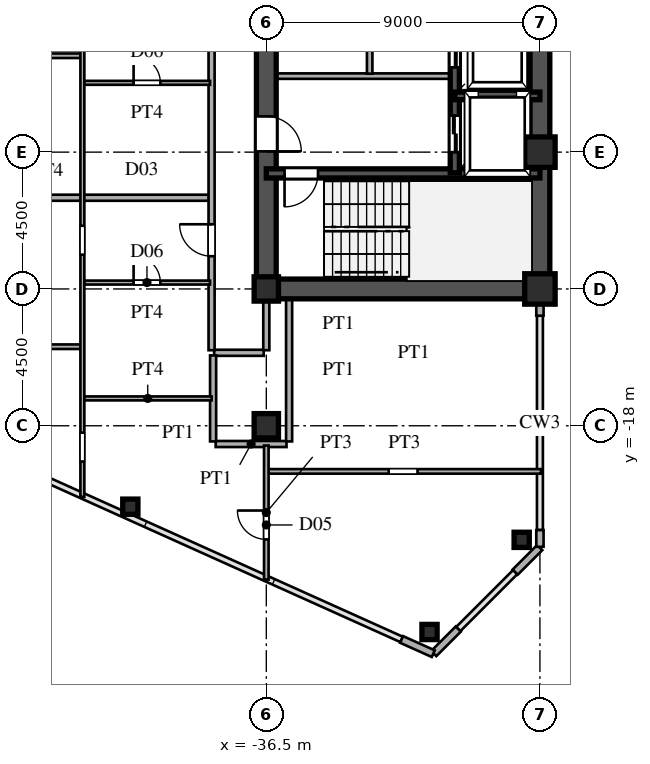
"""IFC4 building model, lengths in metres.
Left out: names, types, materials, properties, quantities, classifications, styles, units other than length and angle.
Written with IfcOpenShell. Run it as: python <this file> out.ifc"""

import sys

from ifc_helpers import new_model, si_unit, direction, frame, frame_2d, origin, origin_2d, place, context, subcontext, project, spatial, rectangle, hollow_rectangle, i_section, extrude, source, transform, mapped, element, fill, save


model = new_model("IFC4")
c1 = context("Model", 3, precision=1e-05, world=origin(), true_north=direction((0.0, 1.0)))
c2 = subcontext(c1, "Body", "Model", "MODEL_VIEW")
j1 = project(units=[si_unit("LENGTHUNIT", "METRE"), si_unit("PLANEANGLEUNIT", "RADIAN")], contexts=[c1])
p1 = place(None, origin())
s1 = spatial("IfcSite", under=j1, at=p1, CompositionType="ELEMENT")
p2 = place(p1, origin())
s2 = spatial("IfcBuilding", under=s1, at=p2, CompositionType="ELEMENT")
p3 = place(p2, frame((0.0, 0.0, 106.8)))
s3 = spatial("IfcBuildingStorey", under=s2, at=p3, CompositionType="ELEMENT", Elevation=106.8)
m1 = source(origin(), c2, "Body", "SweptSolid", [
    extrude(hollow_rectangle(XDim=1.0, YDim=1.0, WallThickness=0.042, at=origin_2d()), origin(), (0.0, 0.0, 1.0), 3.6),
])
for number, where, z_axis, x_axis in (
    (1, (-27.5, -13.5, 0.0), (0.0, 0.0, 1.0), (1.0, 0.0, 0.0)),
    (2, (-27.5, -9.0, 0.0), (0.0, 0.0, 1.0), (1.0, 0.0, 0.0)),
):
    element("IfcColumn", number, at=place(p3, frame(where, z_axis=z_axis, x_axis=x_axis)), inside=s3, PredefinedType="COLUMN", context=c2, shape_type="MappedRepresentation", body=[
        mapped(m1, transform((0.0, 0.0, 0.0), scale=1.0)),
    ])
m2 = source(origin(), c2, "Body", "SweptSolid", [
    extrude(i_section(OverallWidth=0.8, OverallDepth=0.8, WebThickness=0.032, FlangeThickness=0.05, at=origin_2d()), origin(), (0.0, 0.0, 1.0), 3.6),
])
for number, where, z_axis, x_axis in (
    (3, (-36.5, -18.0, 0.0), (0.0, 0.0, 1.0), (1.0, 0.0, 0.0)),
    (4, (-36.5, -13.5, 0.0), (0.0, 0.0, 1.0), (1.0, 0.0, 0.0)),
):
    element("IfcColumn", number, at=place(p3, frame(where, z_axis=z_axis, x_axis=x_axis)), inside=s3, PredefinedType="COLUMN", context=c2, shape_type="MappedRepresentation", body=[
        mapped(m2, transform((0.0, 0.0, 0.0), scale=1.0)),
    ])
m3 = source(origin(), c2, "Body", "SweptSolid", [
    extrude(hollow_rectangle(XDim=0.5, YDim=0.5, WallThickness=0.02, at=origin_2d()), origin(), (0.0, 0.0, 1.0), 3.6),
])
for number, where, z_axis, x_axis in (
    (5, (-28.1, -21.751, 0.0), (0.0, 0.0, 1.0), (1.0, 0.0, 0.0)),
    (6, (-31.131, -24.783, 0.0), (0.0, 0.0, 1.0), (1.0, 0.0, 0.0)),
    (7, (-40.973, -20.661, 0.0), (0.0, 0.0, 1.0), (1.0, 0.0, 0.0)),
):
    element("IfcColumn", number, at=place(p3, frame(where, z_axis=z_axis, x_axis=x_axis)), inside=s3, PredefinedType="COLUMN", context=c2, shape_type="MappedRepresentation", body=[
        mapped(m3, transform((0.0, 0.0, 0.0), scale=1.0)),
    ])
p4 = place(p3, frame((-27.5, -21.98, 0.0), z_axis=(0.0, 0.0, 1.0), x_axis=(0.0, 1.0, 0.0)))
e8 = element("IfcWall", 8, at=p4, inside=s3, PredefinedType="SOLIDWALL", context=c2, shape_type="SweptSolid", body=[
    extrude(rectangle(XDim=0.55, YDim=0.24, at=frame_2d((0.275, 0.0))), origin(), (0.0, 0.0, 1.0), 3.38),
])
p5 = place(p3, frame((-27.5, -14.38, 0.0), z_axis=(0.0, 0.0, 1.0), x_axis=(0.0, 1.0, 0.0)))
e9 = element("IfcWall", 9, at=p5, inside=s3, PredefinedType="SOLIDWALL", context=c2, shape_type="SweptSolid", body=[
    extrude(rectangle(XDim=0.55, YDim=0.24, at=frame_2d((0.275, 0.0))), origin(), (0.0, 0.0, 1.0), 1.88),
])
p6 = place(p3, frame((-32.049, -25.028, 0.0), z_axis=(0.0, 0.0, 1.0), x_axis=(0.911929519623, -0.410346866979, 0.0)))
e10 = element("IfcWall", 10, at=p6, inside=s3, PredefinedType="SOLIDWALL", context=c2, shape_type="SweptSolid", body=[
    extrude(rectangle(XDim=1.14, YDim=0.24, at=frame_2d((0.57, 0.0))), origin(), (0.0, 0.0, 1.0), 3.38),
])
for number, where, z_axis, x_axis in (
    (11, (-30.993, -25.493, 0.0), (0.0, 0.0, 1.0), (0.707, 0.707, 0.0)),
    (12, (-28.313, -22.813, 0.0), (0.0, 0.0, 1.0), (0.707, 0.707, 0.0)),
):
    element("IfcWall", number, at=place(p3, frame(where, z_axis=z_axis, x_axis=x_axis)), inside=s3, PredefinedType="SOLIDWALL", context=c2, shape_type="SweptSolid", body=[
        extrude(rectangle(XDim=1.14, YDim=0.24, at=frame_2d((0.57, 0.0))), origin(), (0.0, 0.0, 1.0), 3.38),
    ])
p7 = place(p3, frame((-27.5, -13.5, 0.0), z_axis=(0.0, 0.0, 1.0), x_axis=(0.0, 1.0, 0.0)))
e13 = element("IfcWall", 13, at=p7, inside=s3, PredefinedType="SHEAR", context=c2, shape_type="SweptSolid", body=[
    extrude(rectangle(XDim=12.2, YDim=0.65, at=frame_2d((6.1, 0.0))), origin(), (0.0, 0.0, 1.0), 3.38),
])
p8 = place(p3, frame((-36.5, -13.5, 0.0), z_axis=(0.0, 0.0, 1.0), x_axis=(1.0, 0.0, 0.0)))
e14 = element("IfcWall", 14, at=p8, inside=s3, PredefinedType="SHEAR", context=c2, shape_type="SweptSolid", body=[
    extrude(rectangle(XDim=9.0, YDim=0.65, at=frame_2d((4.5, 0.0))), origin(), (0.0, 0.0, 1.0), 3.38),
])
p9 = place(p3, frame((-36.5, -13.65, 0.0), z_axis=(0.0, 0.0, 1.0), x_axis=(0.0, 1.0, 0.0)))
e15 = element("IfcWall", 15, at=p9, inside=s3, PredefinedType="SHEAR", context=c2, shape_type="SweptSolid", body=[
    extrude(rectangle(XDim=7.15, YDim=0.65, at=frame_2d((3.575, 0.0))), origin(), (0.0, 0.0, 1.0), 3.38),
])
p10 = place(p9, frame((4.675, 0.0, 0.0)))
e16 = element("IfcOpeningElement", 16, at=p10, cuts=e15, PredefinedType="OPENING", context=c2, shape_type="SweptSolid", body=[
    extrude(rectangle(XDim=1.15, YDim=2.2, at=frame_2d((0.575, 1.1))), frame((0.0, 0.335, 0.0), z_axis=(0.0, -1.0, 0.0), x_axis=(1.0, 0.0, 0.0)), (0.0, 0.0, 1.0), 0.67),
])
p11 = place(p3, frame((-36.5, -6.5, 0.0), z_axis=(0.0, 0.0, 1.0), x_axis=(0.0, 1.0, 0.0)))
e17 = element("IfcWall", 17, at=p11, inside=s3, PredefinedType="SHEAR", context=c2, shape_type="SweptSolid", body=[
    extrude(rectangle(XDim=5.2, YDim=0.65, at=frame_2d((2.6, 0.0))), origin(), (0.0, 0.0, 1.0), 3.38),
])
p12 = place(p11, frame((2.125, 0.0, 0.0)))
e18 = element("IfcOpeningElement", 18, at=p12, cuts=e17, PredefinedType="OPENING", context=c2, shape_type="SweptSolid", body=[
    extrude(rectangle(XDim=0.95, YDim=2.15, at=frame_2d((0.475, 1.075))), frame((0.0, 0.335, 0.0), z_axis=(0.0, -1.0, 0.0), x_axis=(1.0, 0.0, 0.0)), (0.0, 0.0, 1.0), 0.67),
])
p13 = place(p3, frame((-36.5, -9.7, 0.0), z_axis=(0.0, 0.0, 1.0), x_axis=(1.0, 0.0, 0.0)))
e19 = element("IfcWall", 19, at=p13, inside=s3, PredefinedType="SHEAR", context=c2, shape_type="SweptSolid", body=[
    extrude(rectangle(XDim=9.0, YDim=0.3, at=frame_2d((4.5, 0.0))), origin(), (0.0, 0.0, 1.0), 3.38),
])
p14 = place(p13, frame((0.6, 0.0, 0.0)))
e20 = element("IfcOpeningElement", 20, at=p14, cuts=e19, PredefinedType="OPENING", context=c2, shape_type="SweptSolid", body=[
    extrude(rectangle(XDim=1.1, YDim=2.2, at=frame_2d((0.55, 1.1))), frame((0.0, 0.16, 0.0), z_axis=(0.0, -1.0, 0.0), x_axis=(1.0, 0.0, 0.0)), (0.0, 0.0, 1.0), 0.32),
])
p15 = place(p3, frame((-30.3, -7.15, 0.0), z_axis=(0.0, 0.0, 1.0), x_axis=(1.0, 0.0, 0.0)))
e21 = element("IfcWall", 21, at=p15, inside=s3, PredefinedType="SHEAR", context=c2, shape_type="SweptSolid", body=[
    extrude(rectangle(XDim=2.8, YDim=0.25, at=frame_2d((1.4, 0.0))), origin(), (0.0, 0.0, 1.0), 3.38),
])
p16 = place(p3, frame((-30.3, -9.68, 0.0), z_axis=(0.0, 0.0, 1.0), x_axis=(0.0, 1.0, 0.0)))
e22 = element("IfcWall", 22, at=p16, inside=s3, PredefinedType="SHEAR", context=c2, shape_type="SweptSolid", body=[
    extrude(rectangle(XDim=2.56, YDim=0.3, at=frame_2d((1.28, 0.0))), origin(), (0.0, 0.0, 1.0), 3.38),
])
p17 = place(p16, frame((0.68, 0.0, 0.0)))
e23 = element("IfcOpeningElement", 23, at=p17, cuts=e22, PredefinedType="OPENING", context=c2, shape_type="SweptSolid", body=[
    extrude(rectangle(XDim=1.2, YDim=2.25, at=frame_2d((0.6, 1.125))), frame((0.0, 0.16, 0.0), z_axis=(0.0, -1.0, 0.0), x_axis=(1.0, 0.0, 0.0)), (0.0, 0.0, 1.0), 0.32),
])
p18 = place(p3, frame((-30.3, -7.12, 0.0), z_axis=(0.0, 0.0, 1.0), x_axis=(0.0, 1.0, 0.0)))
e24 = element("IfcWall", 24, at=p18, inside=s3, PredefinedType="SHEAR", context=c2, shape_type="SweptSolid", body=[
    extrude(rectangle(XDim=2.92, YDim=0.3, at=frame_2d((1.46, 0.0))), origin(), (0.0, 0.0, 1.0), 3.38),
])
p19 = place(p18, frame((0.91, 0.0, 0.0)))
e25 = element("IfcOpeningElement", 25, at=p19, cuts=e24, PredefinedType="OPENING", context=c2, shape_type="SweptSolid", body=[
    extrude(rectangle(XDim=1.1, YDim=2.2, at=frame_2d((0.55, 1.1))), frame((0.0, 0.16, 0.0), z_axis=(0.0, -1.0, 0.0), x_axis=(1.0, 0.0, 0.0)), (0.0, 0.0, 1.0), 0.32),
])
p20 = place(p3, frame((-36.15, -6.5, 0.0), z_axis=(0.0, 0.0, 1.0), x_axis=(1.0, 0.0, 0.0)))
e26 = element("IfcWall", 26, at=p20, inside=s3, PredefinedType="PARTITIONING", context=c2, shape_type="SweptSolid", body=[
    extrude(rectangle(XDim=5.7, YDim=0.18, at=frame_2d((2.85, 0.0))), origin(), (0.0, 0.0, 1.0), 3.38),
])
p21 = place(p3, frame((-33.1, -6.42, 0.0), z_axis=(0.0, 0.0, 1.0), x_axis=(0.0, 1.0, 0.0)))
e27 = element("IfcWall", 27, at=p21, inside=s3, PredefinedType="PARTITIONING", context=c2, shape_type="SweptSolid", body=[
    extrude(rectangle(XDim=5.04, YDim=0.18, at=frame_2d((2.52, 0.0))), origin(), (0.0, 0.0, 1.0), 3.38),
])
p22 = place(p3, frame((-36.45, -19.5, 0.0), z_axis=(0.0, 0.0, 1.0), x_axis=(1.0, 0.0, 0.0)))
e28 = element("IfcWall", 28, at=p22, inside=s3, PredefinedType="PARTITIONING", context=c2, shape_type="SweptSolid", body=[
    extrude(rectangle(XDim=8.985, YDim=0.15, at=frame_2d((4.492, 0.0))), origin(), (0.0, 0.0, 1.0), 3.38),
])
p23 = place(p22, frame((3.975, 0.0, 0.0)))
e29 = element("IfcOpeningElement", 29, at=p23, cuts=e28, PredefinedType="OPENING", context=c2, shape_type="SweptSolid", body=[
    extrude(rectangle(XDim=0.95, YDim=2.15, at=frame_2d((0.475, 1.075))), frame((0.0, 0.085, 0.0), z_axis=(0.0, -1.0, 0.0), x_axis=(1.0, 0.0, 0.0)), (0.0, 0.0, 1.0), 0.17),
])
p24 = place(p3, frame((-38.165, -18.6, 0.0), z_axis=(0.0, 0.0, 1.0), x_axis=(1.0, 0.0, 0.0)))
e30 = element("IfcWall", 30, at=p24, inside=s3, PredefinedType="PARTITIONING", context=c2, shape_type="SweptSolid", body=[
    extrude(rectangle(XDim=0.753, YDim=0.2, at=frame_2d((0.376, 0.0))), origin(), (0.0, 0.0, 1.0), 2.08),
])
p25 = place(p3, frame((-37.412, -18.6, 0.0), z_axis=(0.0, 0.0, 1.0), x_axis=(1.0, 0.0, 0.0)))
e31 = element("IfcWall", 31, at=p25, inside=s3, PredefinedType="PARTITIONING", context=c2, shape_type="SweptSolid", body=[
    extrude(rectangle(XDim=1.577, YDim=0.2, at=frame_2d((0.789, 0.0))), origin(), (0.0, 0.0, 1.0), 3.38),
])
p26 = place(p3, frame((-42.5, -17.1, 0.0), z_axis=(0.0, 0.0, 1.0), x_axis=(1.0, 0.0, 0.0)))
e32 = element("IfcWall", 32, at=p26, inside=s3, PredefinedType="PARTITIONING", context=c2, shape_type="SweptSolid", body=[
    extrude(rectangle(XDim=4.2, YDim=0.13, at=frame_2d((2.1, 0.0))), origin(), (0.0, 0.0, 1.0), 3.38),
])
p27 = place(p3, frame((-38.215, -15.6, 0.0), z_axis=(0.0, 0.0, 1.0), x_axis=(1.0, 0.0, 0.0)))
e33 = element("IfcWall", 33, at=p27, inside=s3, PredefinedType="PARTITIONING", context=c2, shape_type="SweptSolid", body=[
    extrude(rectangle(XDim=1.63, YDim=0.2, at=frame_2d((0.815, 0.0))), origin(), (0.0, 0.0, 1.0), 3.38),
])
p28 = place(p3, frame((-53.477, -15.4, 0.0), z_axis=(0.0, 0.0, 1.0), x_axis=(1.0, 0.0, 0.0)))
e34 = element("IfcWall", 34, at=p28, inside=s3, PredefinedType="PARTITIONING", context=c2, shape_type="SweptSolid", body=[
    extrude(rectangle(XDim=10.877, YDim=0.15, at=frame_2d((5.438, 0.0))), origin(), (0.0, 0.0, 1.0), 3.38),
])
p29 = place(p28, frame((7.465, 0.0, 0.0)))
e35 = element("IfcOpeningElement", 35, at=p29, cuts=e34, PredefinedType="OPENING", context=c2, shape_type="SweptSolid", body=[
    extrude(rectangle(XDim=0.95, YDim=2.15, at=frame_2d((0.475, 1.075))), frame((0.0, 0.085, 0.0), z_axis=(0.0, -1.0, 0.0), x_axis=(1.0, 0.0, 0.0)), (0.0, 0.0, 1.0), 0.17),
])
p30 = place(p3, frame((-42.5, -13.29, 0.0), z_axis=(0.0, 0.0, 1.0), x_axis=(1.0, 0.0, 0.0)))
e36 = element("IfcWall", 36, at=p30, inside=s3, PredefinedType="PARTITIONING", context=c2, shape_type="SweptSolid", body=[
    extrude(rectangle(XDim=4.15, YDim=0.13, at=frame_2d((2.075, 0.0))), origin(), (0.0, 0.0, 1.0), 3.38),
])
p31 = place(p30, frame((1.635, 0.0, 0.0)))
e37 = element("IfcOpeningElement", 37, at=p31, cuts=e36, PredefinedType="OPENING", context=c2, shape_type="SweptSolid", body=[
    extrude(rectangle(XDim=0.88, YDim=2.1, at=frame_2d((0.44, 1.05))), frame((0.0, 0.075, 0.0), z_axis=(0.0, -1.0, 0.0), x_axis=(1.0, 0.0, 0.0)), (0.0, 0.0, 1.0), 0.15),
])
p32 = place(p3, frame((-64.346, -10.5, 0.0), z_axis=(0.0, 0.0, 1.0), x_axis=(1.0, 0.0, 0.0)))
e38 = element("IfcWall", 38, at=p32, inside=s3, PredefinedType="PARTITIONING", context=c2, shape_type="SweptSolid", body=[
    extrude(rectangle(XDim=25.966, YDim=0.2, at=frame_2d((12.983, 0.0))), origin(), (0.0, 0.0, 1.0), 3.38),
])
p33 = place(p3, frame((-42.5, -6.72, 0.0), z_axis=(0.0, 0.0, 1.0), x_axis=(1.0, 0.0, 0.0)))
e39 = element("IfcWall", 39, at=p33, inside=s3, PredefinedType="PARTITIONING", context=c2, shape_type="SweptSolid", body=[
    extrude(rectangle(XDim=4.15, YDim=0.13, at=frame_2d((2.075, 0.0))), origin(), (0.0, 0.0, 1.0), 3.38),
])
p34 = place(p33, frame((1.635, 0.0, 0.0)))
e40 = element("IfcOpeningElement", 40, at=p34, cuts=e39, PredefinedType="OPENING", context=c2, shape_type="SweptSolid", body=[
    extrude(rectangle(XDim=0.88, YDim=2.1, at=frame_2d((0.44, 1.05))), frame((0.0, 0.075, 0.0), z_axis=(0.0, -1.0, 0.0), x_axis=(1.0, 0.0, 0.0)), (0.0, 0.0, 1.0), 0.15),
])
p35 = place(p3, frame((-71.035, -5.83, 0.0), z_axis=(0.0, 0.0, 1.0), x_axis=(1.0, 0.0, 0.0)))
e41 = element("IfcWall", 41, at=p35, inside=s3, PredefinedType="PARTITIONING", context=c2, shape_type="SweptSolid", body=[
    extrude(rectangle(XDim=28.435, YDim=0.15, at=frame_2d((14.217, 0.0))), origin(), (0.0, 0.0, 1.0), 3.38),
])
p36 = place(p35, frame((22.035, 0.0, 0.0)))
e42 = element("IfcOpeningElement", 42, at=p36, cuts=e41, PredefinedType="OPENING", context=c2, shape_type="SweptSolid", body=[
    extrude(rectangle(XDim=0.95, YDim=2.15, at=frame_2d((0.475, 1.075))), frame((0.0, 0.085, 0.0), z_axis=(0.0, -1.0, 0.0), x_axis=(1.0, 0.0, 0.0)), (0.0, 0.0, 1.0), 0.17),
])
p37 = place(p35, frame((13.21, 0.0, 0.0)))
e43 = element("IfcOpeningElement", 43, at=p37, cuts=e41, PredefinedType="OPENING", context=c2, shape_type="SweptSolid", body=[
    extrude(rectangle(XDim=0.95, YDim=2.15, at=frame_2d((0.475, 1.075))), frame((0.0, 0.085, 0.0), z_axis=(0.0, -1.0, 0.0), x_axis=(1.0, 0.0, 0.0)), (0.0, 0.0, 1.0), 0.17),
])
p38 = place(p3, frame((-42.55, -20.337, 0.0), z_axis=(0.0, 0.0, 1.0), x_axis=(0.0, 1.0, 0.0)))
e44 = element("IfcWall", 44, at=p38, inside=s3, PredefinedType="PARTITIONING", context=c2, shape_type="SweptSolid", body=[
    extrude(rectangle(XDim=19.12, YDim=0.13, at=frame_2d((9.56, 0.0))), origin(), (0.0, 0.0, 1.0), 3.38),
])
p39 = place(p38, frame((7.965, 0.0, 0.0)))
e45 = element("IfcOpeningElement", 45, at=p39, cuts=e44, PredefinedType="OPENING", context=c2, shape_type="SweptSolid", body=[
    extrude(rectangle(XDim=0.95, YDim=2.15, at=frame_2d((0.475, 1.075))), frame((0.0, 0.075, 0.0), z_axis=(0.0, -1.0, 0.0), x_axis=(1.0, 0.0, 0.0)), (0.0, 0.0, 1.0), 0.15),
])
p40 = place(p38, frame((1.161, 0.0, 0.0)))
e46 = element("IfcOpeningElement", 46, at=p40, cuts=e44, PredefinedType="OPENING", context=c2, shape_type="SweptSolid", body=[
    extrude(rectangle(XDim=0.95, YDim=2.15, at=frame_2d((0.475, 1.075))), frame((0.0, 0.075, 0.0), z_axis=(0.0, -1.0, 0.0), x_axis=(1.0, 0.0, 0.0)), (0.0, 0.0, 1.0), 0.15),
])
p41 = place(p38, frame((16.362, 0.0, 0.0)))
e47 = element("IfcOpeningElement", 47, at=p41, cuts=e44, PredefinedType="OPENING", context=c2, shape_type="SweptSolid", body=[
    extrude(rectangle(XDim=0.95, YDim=2.15, at=frame_2d((0.475, 1.075))), frame((0.0, 0.075, 0.0), z_axis=(0.0, -1.0, 0.0), x_axis=(1.0, 0.0, 0.0)), (0.0, 0.0, 1.0), 0.15),
])
p42 = place(p3, frame((-38.3, -15.515, 0.0), z_axis=(0.0, 0.0, 1.0), x_axis=(0.0, 1.0, 0.0)))
e48 = element("IfcWall", 48, at=p42, inside=s3, PredefinedType="PARTITIONING", context=c2, shape_type="SweptSolid", body=[
    extrude(rectangle(XDim=31.03, YDim=0.2, at=frame_2d((15.515, 0.0))), origin(), (0.0, 0.0, 1.0), 3.38),
])
p43 = place(p42, frame((3.093, 0.0, 0.0)))
e49 = element("IfcOpeningElement", 49, at=p43, cuts=e48, PredefinedType="OPENING", context=c2, shape_type="SweptSolid", body=[
    extrude(rectangle(XDim=1.05, YDim=2.25, at=frame_2d((0.525, 1.125))), frame((0.0, 0.11, 0.0), z_axis=(0.0, -1.0, 0.0), x_axis=(1.0, 0.0, 0.0)), (0.0, 0.0, 1.0), 0.22),
])
p44 = place(p42, frame((11.28, 0.0, 0.0)))
e50 = element("IfcOpeningElement", 50, at=p44, cuts=e48, PredefinedType="OPENING", context=c2, shape_type="SweptSolid", body=[
    extrude(rectangle(XDim=1.05, YDim=2.25, at=frame_2d((0.525, 1.125))), frame((0.0, 0.11, 0.0), z_axis=(0.0, -1.0, 0.0), x_axis=(1.0, 0.0, 0.0)), (0.0, 0.0, 1.0), 0.22),
])
p45 = place(p42, frame((19.887, 0.0, 0.0)))
e51 = element("IfcOpeningElement", 51, at=p45, cuts=e48, PredefinedType="OPENING", context=c2, shape_type="SweptSolid", body=[
    extrude(rectangle(XDim=1.05, YDim=2.25, at=frame_2d((0.525, 1.125))), frame((0.0, 0.11, 0.0), z_axis=(0.0, -1.0, 0.0), x_axis=(1.0, 0.0, 0.0)), (0.0, 0.0, 1.0), 0.22),
])
p46 = place(p3, frame((-38.25, -18.515, 0.0), z_axis=(0.0, 0.0, 1.0), x_axis=(0.0, 1.0, 0.0)))
e52 = element("IfcWall", 52, at=p46, inside=s3, PredefinedType="PARTITIONING", context=c2, shape_type="SweptSolid", body=[
    extrude(rectangle(XDim=2.83, YDim=0.2, at=frame_2d((1.415, 0.0))), origin(), (0.0, 0.0, 1.0), 3.38),
])
p47 = place(p3, frame((-36.5, -23.06, 0.0), z_axis=(0.0, 0.0, 1.0), x_axis=(0.0, 1.0, 0.0)))
e53 = element("IfcWall", 53, at=p47, inside=s3, PredefinedType="PARTITIONING", context=c2, shape_type="SweptSolid", body=[
    extrude(rectangle(XDim=4.41, YDim=0.15, at=frame_2d((2.205, 0.0))), origin(), (0.0, 0.0, 1.0), 3.38),
])
p48 = place(p47, frame((1.323, 0.0, 0.0)))
e54 = element("IfcOpeningElement", 54, at=p48, cuts=e53, PredefinedType="OPENING", context=c2, shape_type="SweptSolid", body=[
    extrude(rectangle(XDim=0.95, YDim=2.15, at=frame_2d((0.475, 1.075))), frame((0.0, 0.085, 0.0), z_axis=(0.0, -1.0, 0.0), x_axis=(1.0, 0.0, 0.0)), (0.0, 0.0, 1.0), 0.17),
])
p49 = place(p3, frame((-36.5, -15.515, 0.0), z_axis=(0.0, 0.0, 1.0), x_axis=(0.0, 1.0, 0.0)))
e55 = element("IfcWall", 55, at=p49, inside=s3, PredefinedType="PARTITIONING", context=c2, shape_type="SweptSolid", body=[
    extrude(rectangle(XDim=1.685, YDim=0.2, at=frame_2d((0.842, 0.0))), origin(), (0.0, 0.0, 1.0), 1.38),
])
p50 = place(p3, frame((-35.75, -18.515, 0.0), z_axis=(0.0, 0.0, 1.0), x_axis=(0.0, 1.0, 0.0)))
e56 = element("IfcWall", 56, at=p50, inside=s3, PredefinedType="PARTITIONING", context=c2, shape_type="SweptSolid", body=[
    extrude(rectangle(XDim=4.685, YDim=0.2, at=frame_2d((2.342, 0.0))), origin(), (0.0, 0.0, 1.0), 3.38),
])
m4 = source(origin(), c2, "Body", "SweptSolid", [
    extrude(rectangle(XDim=1.15, YDim=2.2, at=frame_2d((0.575, 1.1))), frame((0.0, 0.025, 0.0), z_axis=(0.0, -1.0, 0.0), x_axis=(1.0, 0.0, 0.0)), (0.0, 0.0, 1.0), 0.05),
])
p51 = place(p10, frame((1.15, 0.0, 0.0), z_axis=(0.0, 0.0, 1.0), x_axis=(-1.0, 0.0, 0.0)))
e57 = element("IfcDoor", 57, at=p51, inside=s3, OperationType="SINGLE_SWING_LEFT", PredefinedType="DOOR", context=c2, shape_type="MappedRepresentation", body=[
    mapped(m4, transform((0.0, 0.0, 0.0), scale=1.0)),
])
fill(e16, e57)
m5 = source(origin(), c2, "Body", "SweptSolid", [
    extrude(rectangle(XDim=1.1, YDim=2.2, at=frame_2d((0.55, 1.1))), frame((0.0, 0.025, 0.0), z_axis=(0.0, -1.0, 0.0), x_axis=(1.0, 0.0, 0.0)), (0.0, 0.0, 1.0), 0.05),
])
p52 = place(p14, frame((1.1, 0.0, 0.0), z_axis=(0.0, 0.0, 1.0), x_axis=(-1.0, 0.0, 0.0)))
e58 = element("IfcDoor", 58, at=p52, inside=s3, OperationType="SINGLE_SWING_LEFT", PredefinedType="DOOR", context=c2, shape_type="MappedRepresentation", body=[
    mapped(m5, transform((0.0, 0.0, 0.0), scale=1.0)),
])
fill(e20, e58)
m6 = source(origin(), c2, "Body", "SweptSolid", [
    extrude(rectangle(XDim=1.2, YDim=2.25, at=frame_2d((0.6, 1.125))), frame((0.0, 0.025, 0.0), z_axis=(0.0, -1.0, 0.0), x_axis=(1.0, 0.0, 0.0)), (0.0, 0.0, 1.0), 0.05),
])
p53 = place(p17, origin())
e59 = element("IfcDoor", 59, at=p53, inside=s3, OperationType="DOUBLE_DOOR_SLIDING", PredefinedType="DOOR", context=c2, shape_type="MappedRepresentation", body=[
    mapped(m6, transform((0.0, 0.0, 0.0), scale=1.0)),
])
fill(e23, e59)
m7 = source(origin(), c2, "Body", "SweptSolid", [
    extrude(rectangle(XDim=1.1, YDim=2.2, at=frame_2d((0.55, 1.1))), frame((0.0, 0.025, 0.0), z_axis=(0.0, -1.0, 0.0), x_axis=(1.0, 0.0, 0.0)), (0.0, 0.0, 1.0), 0.05),
])
p54 = place(p19, origin())
e60 = element("IfcDoor", 60, at=p54, inside=s3, OperationType="DOUBLE_DOOR_SLIDING", PredefinedType="DOOR", context=c2, shape_type="MappedRepresentation", body=[
    mapped(m7, transform((0.0, 0.0, 0.0), scale=1.0)),
])
fill(e25, e60)
m8 = source(origin(), c2, "Body", "SweptSolid", [
    extrude(rectangle(XDim=0.88, YDim=2.1, at=frame_2d((0.44, 1.05))), frame((0.0, 0.025, 0.0), z_axis=(0.0, -1.0, 0.0), x_axis=(1.0, 0.0, 0.0)), (0.0, 0.0, 1.0), 0.05),
])
p55 = place(p31, origin())
e61 = element("IfcDoor", 61, at=p55, inside=s3, OperationType="SINGLE_SWING_LEFT", PredefinedType="DOOR", context=c2, shape_type="MappedRepresentation", body=[
    mapped(m8, transform((0.0, 0.0, 0.0), scale=1.0)),
])
fill(e37, e61)
p56 = place(p34, origin())
e62 = element("IfcDoor", 62, at=p56, inside=s3, OperationType="SINGLE_SWING_LEFT", PredefinedType="DOOR", context=c2, shape_type="MappedRepresentation", body=[
    mapped(m8, transform((0.0, 0.0, 0.0), scale=1.0)),
])
fill(e40, e62)
m9 = source(origin(), c2, "Body", "SweptSolid", [
    extrude(rectangle(XDim=1.05, YDim=2.25, at=frame_2d((0.525, 1.125))), frame((0.0, 0.025, 0.0), z_axis=(0.0, -1.0, 0.0), x_axis=(1.0, 0.0, 0.0)), (0.0, 0.0, 1.0), 0.05),
])
p57 = place(p43, origin())
e63 = element("IfcDoor", 63, at=p57, inside=s3, OperationType="SINGLE_SWING_RIGHT", PredefinedType="DOOR", context=c2, shape_type="MappedRepresentation", body=[
    mapped(m9, transform((0.0, 0.0, 0.0), scale=1.0)),
])
fill(e49, e63)
m10 = source(origin(), c2, "Body", "SweptSolid", [
    extrude(rectangle(XDim=0.95, YDim=2.15, at=frame_2d((0.475, 1.075))), frame((0.0, 0.025, 0.0), z_axis=(0.0, -1.0, 0.0), x_axis=(1.0, 0.0, 0.0)), (0.0, 0.0, 1.0), 0.05),
])
p58 = place(p48, origin())
e64 = element("IfcDoor", 64, at=p58, inside=s3, OperationType="SINGLE_SWING_RIGHT", PredefinedType="DOOR", context=c2, shape_type="MappedRepresentation", body=[
    mapped(m10, transform((0.0, 0.0, 0.0), scale=1.0)),
])
fill(e54, e64)
save(model, sys.argv[1])
